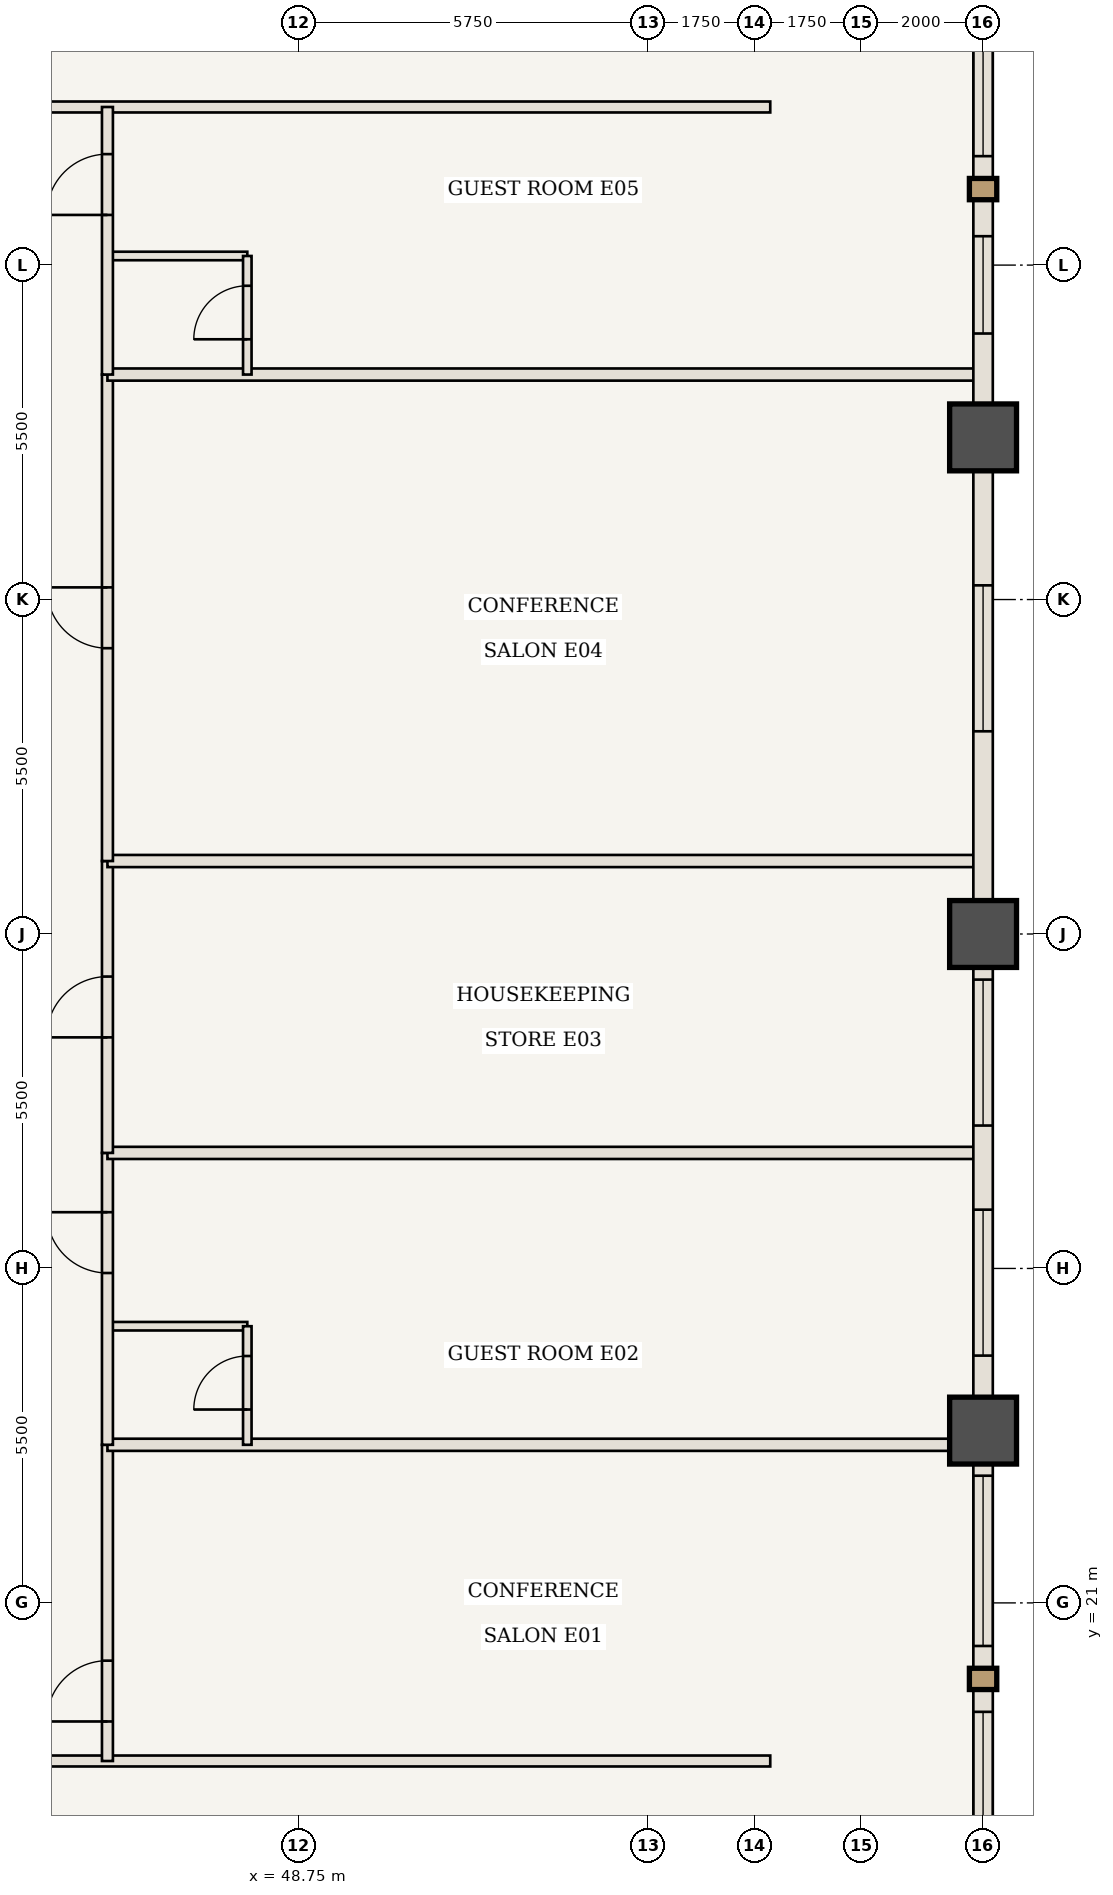
"""IFC4 building model, lengths in metres.
Left out: names, types, materials, properties, quantities, classifications, styles, units other than length and angle.
Written with IfcOpenShell. Run it as: python <this file> out.ifc"""

import sys

from ifc_helpers import new_model, si_unit, direction, frame, frame_2d, origin, origin_2d, place, context, subcontext, project, spatial, rectangle, extrude, element, fill, save


model = new_model("IFC4")
c1 = context("Model", 3, precision=1e-05, world=origin(), true_north=direction((0.0, 1.0)))
c2 = subcontext(c1, "Body", "Model", "MODEL_VIEW")
j1 = project(units=[si_unit("LENGTHUNIT", "METRE"), si_unit("PLANEANGLEUNIT", "RADIAN")], contexts=[c1])
p1 = place(None, origin())
s1 = spatial("IfcSite", under=j1, at=p1, CompositionType="ELEMENT")
p2 = place(p1, origin())
s2 = spatial("IfcBuilding", under=s1, at=p2, CompositionType="ELEMENT")
p3 = place(p2, frame((0.0, 0.0, 45.85)))
s3 = spatial("IfcBuildingStorey", under=s2, at=p3, CompositionType="ELEMENT", Elevation=45.85)
for number, where, z_axis, x_axis in (
    (1, (60.0, 23.833, 0.0), (0.0, 0.0, 1.0), (1.0, 0.0, 0.0)),
    (2, (60.0, 32.0, 0.0), (0.0, 0.0, 1.0), (1.0, 0.0, 0.0)),
    (3, (60.0, 40.167, 0.0), (0.0, 0.0, 1.0), (1.0, 0.0, 0.0)),
):
    element("IfcColumn", number, at=place(p3, frame(where, z_axis=z_axis, x_axis=x_axis)), inside=s3, PredefinedType="COLUMN", context=c2, shape_type="SweptSolid", body=[
        extrude(rectangle(XDim=1.1, YDim=1.1, at=origin_2d()), origin(), (0.0, 0.0, 1.0), 3.5),
    ])
p4 = place(p3, frame((37.9, 18.4, 0.0), z_axis=(0.0, 0.0, 1.0), x_axis=(1.0, 0.0, 0.0)))
e4 = element("IfcWall", 4, at=p4, inside=s3, PredefinedType="STANDARD", context=c2, shape_type="SweptSolid", body=[
    extrude(rectangle(XDim=18.6, YDim=0.18, at=frame_2d((9.3, 0.0))), origin(), (0.0, 0.0, 1.0), 3.32),
])
p5 = place(p4, frame((4.775, 0.0, 0.0)))
e5 = element("IfcOpeningElement", 5, at=p5, cuts=e4, PredefinedType="OPENING", context=c2, shape_type="SweptSolid", body=[
    extrude(rectangle(XDim=1.0, YDim=2.15, at=frame_2d((0.5, 1.075))), frame((0.0, 0.1, 0.0), z_axis=(0.0, -1.0, 0.0), x_axis=(1.0, 0.0, 0.0)), (0.0, 0.0, 1.0), 0.2),
])
p6 = place(p3, frame((38.2, 45.6, 0.0), z_axis=(0.0, 0.0, 1.0), x_axis=(1.0, 0.0, 0.0)))
e6 = element("IfcWall", 6, at=p6, inside=s3, PredefinedType="STANDARD", context=c2, shape_type="SweptSolid", body=[
    extrude(rectangle(XDim=18.3, YDim=0.18, at=frame_2d((9.15, 0.0))), origin(), (0.0, 0.0, 1.0), 3.32),
])
p7 = place(p6, frame((4.625, 0.0, 0.0)))
e7 = element("IfcOpeningElement", 7, at=p7, cuts=e6, PredefinedType="OPENING", context=c2, shape_type="SweptSolid", body=[
    extrude(rectangle(XDim=1.0, YDim=2.15, at=frame_2d((0.5, 1.075))), frame((0.0, 0.1, 0.0), z_axis=(0.0, -1.0, 0.0), x_axis=(1.0, 0.0, 0.0)), (0.0, 0.0, 1.0), 0.2),
])
p8 = place(p3, frame((45.6, 18.4, 0.0), z_axis=(0.0, 0.0, 1.0), x_axis=(0.0, 1.0, 0.0)))
e8 = element("IfcWall", 8, at=p8, inside=s3, PredefinedType="STANDARD", context=c2, shape_type="SweptSolid", body=[
    extrude(rectangle(XDim=5.2, YDim=0.18, at=frame_2d((2.6, 0.0))), origin(), (0.0, 0.0, 1.0), 3.32),
])
p9 = place(p8, frame((0.65, 0.0, 0.0)))
e9 = element("IfcOpeningElement", 9, at=p9, cuts=e8, PredefinedType="OPENING", context=c2, shape_type="SweptSolid", body=[
    extrude(rectangle(XDim=1.0, YDim=2.15, at=frame_2d((0.5, 1.075))), frame((0.0, 0.1, 0.0), z_axis=(0.0, -1.0, 0.0), x_axis=(1.0, 0.0, 0.0)), (0.0, 0.0, 1.0), 0.2),
])
p10 = place(p3, frame((45.6, 23.6, 0.0), z_axis=(0.0, 0.0, 1.0), x_axis=(1.0, 0.0, 0.0)))
e10 = element("IfcWall", 10, at=p10, inside=s3, PredefinedType="STANDARD", context=c2, shape_type="SweptSolid", body=[
    extrude(rectangle(XDim=14.34, YDim=0.2, at=frame_2d((7.17, 0.0))), origin(), (0.0, 0.0, 1.0), 3.32),
])
p11 = place(p3, frame((45.6, 25.55, 0.0), z_axis=(0.0, 0.0, 1.0), x_axis=(1.0, 0.0, 0.0)))
e11 = element("IfcWall", 11, at=p11, inside=s3, PredefinedType="STANDARD", context=c2, shape_type="SweptSolid", body=[
    extrude(rectangle(XDim=2.3, YDim=0.14, at=frame_2d((1.15, 0.0))), origin(), (0.0, 0.0, 1.0), 3.32),
])
p12 = place(p3, frame((47.9, 23.6, 0.0), z_axis=(0.0, 0.0, 1.0), x_axis=(0.0, 1.0, 0.0)))
e12 = element("IfcWall", 12, at=p12, inside=s3, PredefinedType="STANDARD", context=c2, shape_type="SweptSolid", body=[
    extrude(rectangle(XDim=1.95, YDim=0.14, at=frame_2d((0.975, 0.0))), origin(), (0.0, 0.0, 1.0), 3.32),
])
p13 = place(p12, frame((0.58, 0.0, 0.0)))
e13 = element("IfcOpeningElement", 13, at=p13, cuts=e12, PredefinedType="OPENING", context=c2, shape_type="SweptSolid", body=[
    extrude(rectangle(XDim=0.88, YDim=2.1, at=frame_2d((0.44, 1.05))), frame((0.0, 0.08, 0.0), z_axis=(0.0, -1.0, 0.0), x_axis=(1.0, 0.0, 0.0)), (0.0, 0.0, 1.0), 0.16),
])
p14 = place(p3, frame((45.6, 23.6, 0.0), z_axis=(0.0, 0.0, 1.0), x_axis=(0.0, 1.0, 0.0)))
e14 = element("IfcWall", 14, at=p14, inside=s3, PredefinedType="STANDARD", context=c2, shape_type="SweptSolid", body=[
    extrude(rectangle(XDim=4.8, YDim=0.18, at=frame_2d((2.4, 0.0))), origin(), (0.0, 0.0, 1.0), 3.32),
])
p15 = place(p14, frame((2.825, 0.0, 0.0)))
e15 = element("IfcOpeningElement", 15, at=p15, cuts=e14, PredefinedType="OPENING", context=c2, shape_type="SweptSolid", body=[
    extrude(rectangle(XDim=1.0, YDim=2.15, at=frame_2d((0.5, 1.075))), frame((0.0, 0.1, 0.0), z_axis=(0.0, -1.0, 0.0), x_axis=(1.0, 0.0, 0.0)), (0.0, 0.0, 1.0), 0.2),
])
p16 = place(p3, frame((45.6, 28.4, 0.0), z_axis=(0.0, 0.0, 1.0), x_axis=(1.0, 0.0, 0.0)))
e16 = element("IfcWall", 16, at=p16, inside=s3, PredefinedType="STANDARD", context=c2, shape_type="SweptSolid", body=[
    extrude(rectangle(XDim=14.34, YDim=0.2, at=frame_2d((7.17, 0.0))), origin(), (0.0, 0.0, 1.0), 3.32),
])
p17 = place(p3, frame((45.6, 28.4, 0.0), z_axis=(0.0, 0.0, 1.0), x_axis=(0.0, 1.0, 0.0)))
e17 = element("IfcWall", 17, at=p17, inside=s3, PredefinedType="STANDARD", context=c2, shape_type="SweptSolid", body=[
    extrude(rectangle(XDim=4.8, YDim=0.18, at=frame_2d((2.4, 0.0))), origin(), (0.0, 0.0, 1.0), 3.32),
])
p18 = place(p17, frame((1.9, 0.0, 0.0)))
e18 = element("IfcOpeningElement", 18, at=p18, cuts=e17, PredefinedType="OPENING", context=c2, shape_type="SweptSolid", body=[
    extrude(rectangle(XDim=1.0, YDim=2.15, at=frame_2d((0.5, 1.075))), frame((0.0, 0.1, 0.0), z_axis=(0.0, -1.0, 0.0), x_axis=(1.0, 0.0, 0.0)), (0.0, 0.0, 1.0), 0.2),
])
p19 = place(p3, frame((45.6, 33.2, 0.0), z_axis=(0.0, 0.0, 1.0), x_axis=(1.0, 0.0, 0.0)))
e19 = element("IfcWall", 19, at=p19, inside=s3, PredefinedType="STANDARD", context=c2, shape_type="SweptSolid", body=[
    extrude(rectangle(XDim=14.34, YDim=0.2, at=frame_2d((7.17, 0.0))), origin(), (0.0, 0.0, 1.0), 3.32),
])
p20 = place(p3, frame((45.6, 33.2, 0.0), z_axis=(0.0, 0.0, 1.0), x_axis=(0.0, 1.0, 0.0)))
e20 = element("IfcWall", 20, at=p20, inside=s3, PredefinedType="STANDARD", context=c2, shape_type="SweptSolid", body=[
    extrude(rectangle(XDim=8.0, YDim=0.18, at=frame_2d((4.0, 0.0))), origin(), (0.0, 0.0, 1.0), 3.32),
])
p21 = place(p20, frame((3.5, 0.0, 0.0)))
e21 = element("IfcOpeningElement", 21, at=p21, cuts=e20, PredefinedType="OPENING", context=c2, shape_type="SweptSolid", body=[
    extrude(rectangle(XDim=1.0, YDim=2.15, at=frame_2d((0.5, 1.075))), frame((0.0, 0.1, 0.0), z_axis=(0.0, -1.0, 0.0), x_axis=(1.0, 0.0, 0.0)), (0.0, 0.0, 1.0), 0.2),
])
p22 = place(p3, frame((45.6, 41.2, 0.0), z_axis=(0.0, 0.0, 1.0), x_axis=(1.0, 0.0, 0.0)))
e22 = element("IfcWall", 22, at=p22, inside=s3, PredefinedType="STANDARD", context=c2, shape_type="SweptSolid", body=[
    extrude(rectangle(XDim=14.34, YDim=0.2, at=frame_2d((7.17, 0.0))), origin(), (0.0, 0.0, 1.0), 3.32),
])
p23 = place(p3, frame((45.6, 43.15, 0.0), z_axis=(0.0, 0.0, 1.0), x_axis=(1.0, 0.0, 0.0)))
e23 = element("IfcWall", 23, at=p23, inside=s3, PredefinedType="STANDARD", context=c2, shape_type="SweptSolid", body=[
    extrude(rectangle(XDim=2.3, YDim=0.14, at=frame_2d((1.15, 0.0))), origin(), (0.0, 0.0, 1.0), 2.615),
])
p24 = place(p3, frame((47.9, 41.2, 0.0), z_axis=(0.0, 0.0, 1.0), x_axis=(0.0, 1.0, 0.0)))
e24 = element("IfcWall", 24, at=p24, inside=s3, PredefinedType="STANDARD", context=c2, shape_type="SweptSolid", body=[
    extrude(rectangle(XDim=1.95, YDim=0.14, at=frame_2d((0.975, 0.0))), origin(), (0.0, 0.0, 1.0), 3.32),
])
p25 = place(p24, frame((0.58, 0.0, 0.0)))
e25 = element("IfcOpeningElement", 25, at=p25, cuts=e24, PredefinedType="OPENING", context=c2, shape_type="SweptSolid", body=[
    extrude(rectangle(XDim=0.88, YDim=2.1, at=frame_2d((0.44, 1.05))), frame((0.0, 0.08, 0.0), z_axis=(0.0, -1.0, 0.0), x_axis=(1.0, 0.0, 0.0)), (0.0, 0.0, 1.0), 0.16),
])
p26 = place(p3, frame((45.6, 41.2, 0.0), z_axis=(0.0, 0.0, 1.0), x_axis=(0.0, 1.0, 0.0)))
e26 = element("IfcWall", 26, at=p26, inside=s3, PredefinedType="STANDARD", context=c2, shape_type="SweptSolid", body=[
    extrude(rectangle(XDim=4.4, YDim=0.18, at=frame_2d((2.2, 0.0))), origin(), (0.0, 0.0, 1.0), 3.32),
])
p27 = place(p26, frame((2.625, 0.0, 0.0)))
e27 = element("IfcOpeningElement", 27, at=p27, cuts=e26, PredefinedType="OPENING", context=c2, shape_type="SweptSolid", body=[
    extrude(rectangle(XDim=1.0, YDim=2.15, at=frame_2d((0.5, 1.075))), frame((0.0, 0.1, 0.0), z_axis=(0.0, -1.0, 0.0), x_axis=(1.0, 0.0, 0.0)), (0.0, 0.0, 1.0), 0.2),
])
p28 = place(p3, frame((60.0, 23.833, 0.0), z_axis=(0.0, 0.0, 1.0), x_axis=(0.0, -1.0, 0.0)))
e28 = element("IfcWall", 28, at=p28, inside=s3, PredefinedType="USERDEFINED", context=c2, shape_type="SweptSolid", body=[
    extrude(rectangle(XDim=8.167, YDim=0.32, at=frame_2d((4.083, 0.0))), origin(), (0.0, 0.0, 1.0), 2.52),
])
p29 = place(p28, frame((0.742, 0.0, 0.85)))
e29 = element("IfcOpeningElement", 29, at=p29, cuts=e28, PredefinedType="OPENING", context=c2, shape_type="SweptSolid", body=[
    extrude(rectangle(XDim=2.8, YDim=1.47, at=frame_2d((1.4, 0.735))), frame((0.0, 0.17, 0.0), z_axis=(0.0, -1.0, 0.0), x_axis=(1.0, 0.0, 0.0)), (0.0, 0.0, 1.0), 0.34),
])
p30 = place(p28, frame((4.625, 0.0, 0.85)))
e30 = element("IfcOpeningElement", 30, at=p30, cuts=e28, PredefinedType="OPENING", context=c2, shape_type="SweptSolid", body=[
    extrude(rectangle(XDim=2.8, YDim=1.47, at=frame_2d((1.4, 0.735))), frame((0.0, 0.17, 0.0), z_axis=(0.0, -1.0, 0.0), x_axis=(1.0, 0.0, 0.0)), (0.0, 0.0, 1.0), 0.34),
])
p31 = place(p3, frame((60.0, 32.0, 0.0), z_axis=(0.0, 0.0, 1.0), x_axis=(0.0, -1.0, 0.0)))
e31 = element("IfcWall", 31, at=p31, inside=s3, PredefinedType="USERDEFINED", context=c2, shape_type="SweptSolid", body=[
    extrude(rectangle(XDim=8.167, YDim=0.32, at=frame_2d((4.083, 0.0))), origin(), (0.0, 0.0, 1.0), 2.52),
])
p32 = place(p31, frame((0.75, 0.0, 0.85)))
e32 = element("IfcOpeningElement", 32, at=p32, cuts=e31, PredefinedType="OPENING", context=c2, shape_type="SweptSolid", body=[
    extrude(rectangle(XDim=2.4, YDim=1.47, at=frame_2d((1.2, 0.735))), frame((0.0, 0.17, 0.0), z_axis=(0.0, -1.0, 0.0), x_axis=(1.0, 0.0, 0.0)), (0.0, 0.0, 1.0), 0.34),
])
p33 = place(p31, frame((4.533, 0.0, 0.85)))
e33 = element("IfcOpeningElement", 33, at=p33, cuts=e31, PredefinedType="OPENING", context=c2, shape_type="SweptSolid", body=[
    extrude(rectangle(XDim=2.4, YDim=1.47, at=frame_2d((1.2, 0.735))), frame((0.0, 0.17, 0.0), z_axis=(0.0, -1.0, 0.0), x_axis=(1.0, 0.0, 0.0)), (0.0, 0.0, 1.0), 0.34),
])
p34 = place(p3, frame((60.0, 40.167, 0.0), z_axis=(0.0, 0.0, 1.0), x_axis=(0.0, -1.0, 0.0)))
e34 = element("IfcWall", 34, at=p34, inside=s3, PredefinedType="USERDEFINED", context=c2, shape_type="SweptSolid", body=[
    extrude(rectangle(XDim=8.167, YDim=0.32, at=frame_2d((4.083, 0.0))), origin(), (0.0, 0.0, 1.0), 2.52),
])
p35 = place(p34, frame((2.433, 0.0, 0.85)))
e35 = element("IfcOpeningElement", 35, at=p35, cuts=e34, PredefinedType="OPENING", context=c2, shape_type="SweptSolid", body=[
    extrude(rectangle(XDim=2.4, YDim=1.47, at=frame_2d((1.2, 0.735))), frame((0.0, 0.17, 0.0), z_axis=(0.0, -1.0, 0.0), x_axis=(1.0, 0.0, 0.0)), (0.0, 0.0, 1.0), 0.34),
])
p36 = place(p3, frame((60.0, 48.333, 0.0), z_axis=(0.0, 0.0, 1.0), x_axis=(0.0, -1.0, 0.0)))
e36 = element("IfcWall", 36, at=p36, inside=s3, PredefinedType="USERDEFINED", context=c2, shape_type="SweptSolid", body=[
    extrude(rectangle(XDim=8.167, YDim=0.32, at=frame_2d((4.083, 0.0))), origin(), (0.0, 0.0, 1.0), 2.52),
])
p37 = place(p36, frame((0.742, 0.0, 0.85)))
e37 = element("IfcOpeningElement", 37, at=p37, cuts=e36, PredefinedType="OPENING", context=c2, shape_type="SweptSolid", body=[
    extrude(rectangle(XDim=2.8, YDim=1.47, at=frame_2d((1.4, 0.735))), frame((0.0, 0.17, 0.0), z_axis=(0.0, -1.0, 0.0), x_axis=(1.0, 0.0, 0.0)), (0.0, 0.0, 1.0), 0.34),
])
p38 = place(p36, frame((4.858, 0.0, 0.85)))
e38 = element("IfcOpeningElement", 38, at=p38, cuts=e36, PredefinedType="OPENING", context=c2, shape_type="SweptSolid", body=[
    extrude(rectangle(XDim=1.6, YDim=1.47, at=frame_2d((0.8, 0.735))), frame((0.0, 0.17, 0.0), z_axis=(0.0, -1.0, 0.0), x_axis=(1.0, 0.0, 0.0)), (0.0, 0.0, 1.0), 0.34),
])
p39 = place(p9, origin())
e39 = element("IfcDoor", 39, at=p39, inside=s3, OperationType="SINGLE_SWING_LEFT", PredefinedType="DOOR", context=c2, shape_type="SweptSolid", body=[
    extrude(rectangle(XDim=1.0, YDim=2.15, at=frame_2d((0.5, 1.075))), frame((0.0, 0.025, 0.0), z_axis=(0.0, -1.0, 0.0), x_axis=(1.0, 0.0, 0.0)), (0.0, 0.0, 1.0), 0.05),
])
fill(e9, e39)
p40 = place(p13, origin())
e40 = element("IfcDoor", 40, at=p40, inside=s3, OperationType="SINGLE_SWING_LEFT", PredefinedType="DOOR", context=c2, shape_type="SweptSolid", body=[
    extrude(rectangle(XDim=0.88, YDim=2.1, at=frame_2d((0.44, 1.05))), frame((0.0, 0.025, 0.0), z_axis=(0.0, -1.0, 0.0), x_axis=(1.0, 0.0, 0.0)), (0.0, 0.0, 1.0), 0.05),
])
fill(e13, e40)
p41 = place(p15, origin())
e41 = element("IfcDoor", 41, at=p41, inside=s3, OperationType="SINGLE_SWING_RIGHT", PredefinedType="DOOR", context=c2, shape_type="SweptSolid", body=[
    extrude(rectangle(XDim=1.0, YDim=2.15, at=frame_2d((0.5, 1.075))), frame((0.0, 0.025, 0.0), z_axis=(0.0, -1.0, 0.0), x_axis=(1.0, 0.0, 0.0)), (0.0, 0.0, 1.0), 0.05),
])
fill(e15, e41)
p42 = place(p18, origin())
e42 = element("IfcDoor", 42, at=p42, inside=s3, OperationType="SINGLE_SWING_LEFT", PredefinedType="DOOR", context=c2, shape_type="SweptSolid", body=[
    extrude(rectangle(XDim=1.0, YDim=2.15, at=frame_2d((0.5, 1.075))), frame((0.0, 0.025, 0.0), z_axis=(0.0, -1.0, 0.0), x_axis=(1.0, 0.0, 0.0)), (0.0, 0.0, 1.0), 0.05),
])
fill(e18, e42)
p43 = place(p21, origin())
e43 = element("IfcDoor", 43, at=p43, inside=s3, OperationType="SINGLE_SWING_RIGHT", PredefinedType="DOOR", context=c2, shape_type="SweptSolid", body=[
    extrude(rectangle(XDim=1.0, YDim=2.15, at=frame_2d((0.5, 1.075))), frame((0.0, 0.025, 0.0), z_axis=(0.0, -1.0, 0.0), x_axis=(1.0, 0.0, 0.0)), (0.0, 0.0, 1.0), 0.05),
])
fill(e21, e43)
p44 = place(p25, origin())
e44 = element("IfcDoor", 44, at=p44, inside=s3, OperationType="SINGLE_SWING_LEFT", PredefinedType="DOOR", context=c2, shape_type="SweptSolid", body=[
    extrude(rectangle(XDim=0.88, YDim=2.1, at=frame_2d((0.44, 1.05))), frame((0.0, 0.025, 0.0), z_axis=(0.0, -1.0, 0.0), x_axis=(1.0, 0.0, 0.0)), (0.0, 0.0, 1.0), 0.05),
])
fill(e25, e44)
p45 = place(p27, origin())
e45 = element("IfcDoor", 45, at=p45, inside=s3, OperationType="SINGLE_SWING_LEFT", PredefinedType="DOOR", context=c2, shape_type="SweptSolid", body=[
    extrude(rectangle(XDim=1.0, YDim=2.15, at=frame_2d((0.5, 1.075))), frame((0.0, 0.025, 0.0), z_axis=(0.0, -1.0, 0.0), x_axis=(1.0, 0.0, 0.0)), (0.0, 0.0, 1.0), 0.05),
])
fill(e27, e45)
p46 = place(p29, origin())
e46 = element("IfcWindow", 46, at=p46, inside=s3, PartitioningType="SINGLE_PANEL", PredefinedType="WINDOW", context=c2, shape_type="SweptSolid", body=[
    extrude(rectangle(XDim=2.8, YDim=1.47, at=frame_2d((1.4, 0.735))), frame((0.0, 0.03, 0.0), z_axis=(0.0, -1.0, 0.0), x_axis=(1.0, 0.0, 0.0)), (0.0, 0.0, 1.0), 0.06),
])
fill(e29, e46)
p47 = place(p30, origin())
e47 = element("IfcWindow", 47, at=p47, inside=s3, PartitioningType="SINGLE_PANEL", PredefinedType="WINDOW", context=c2, shape_type="SweptSolid", body=[
    extrude(rectangle(XDim=2.8, YDim=1.47, at=frame_2d((1.4, 0.735))), frame((0.0, 0.03, 0.0), z_axis=(0.0, -1.0, 0.0), x_axis=(1.0, 0.0, 0.0)), (0.0, 0.0, 1.0), 0.06),
])
fill(e30, e47)
p48 = place(p32, origin())
e48 = element("IfcWindow", 48, at=p48, inside=s3, PartitioningType="SINGLE_PANEL", PredefinedType="WINDOW", context=c2, shape_type="SweptSolid", body=[
    extrude(rectangle(XDim=2.4, YDim=1.47, at=frame_2d((1.2, 0.735))), frame((0.0, 0.03, 0.0), z_axis=(0.0, -1.0, 0.0), x_axis=(1.0, 0.0, 0.0)), (0.0, 0.0, 1.0), 0.06),
])
fill(e32, e48)
p49 = place(p33, origin())
e49 = element("IfcWindow", 49, at=p49, inside=s3, PartitioningType="SINGLE_PANEL", PredefinedType="WINDOW", context=c2, shape_type="SweptSolid", body=[
    extrude(rectangle(XDim=2.4, YDim=1.47, at=frame_2d((1.2, 0.735))), frame((0.0, 0.03, 0.0), z_axis=(0.0, -1.0, 0.0), x_axis=(1.0, 0.0, 0.0)), (0.0, 0.0, 1.0), 0.06),
])
fill(e33, e49)
p50 = place(p35, origin())
e50 = element("IfcWindow", 50, at=p50, inside=s3, PartitioningType="SINGLE_PANEL", PredefinedType="WINDOW", context=c2, shape_type="SweptSolid", body=[
    extrude(rectangle(XDim=2.4, YDim=1.47, at=frame_2d((1.2, 0.735))), frame((0.0, 0.03, 0.0), z_axis=(0.0, -1.0, 0.0), x_axis=(1.0, 0.0, 0.0)), (0.0, 0.0, 1.0), 0.06),
])
fill(e35, e50)
p51 = place(p37, origin())
e51 = element("IfcWindow", 51, at=p51, inside=s3, PartitioningType="SINGLE_PANEL", PredefinedType="WINDOW", context=c2, shape_type="SweptSolid", body=[
    extrude(rectangle(XDim=2.8, YDim=1.47, at=frame_2d((1.4, 0.735))), frame((0.0, 0.03, 0.0), z_axis=(0.0, -1.0, 0.0), x_axis=(1.0, 0.0, 0.0)), (0.0, 0.0, 1.0), 0.06),
])
fill(e37, e51)
p52 = place(p38, origin())
e52 = element("IfcWindow", 52, at=p52, inside=s3, PartitioningType="SINGLE_PANEL", PredefinedType="WINDOW", context=c2, shape_type="SweptSolid", body=[
    extrude(rectangle(XDim=1.6, YDim=1.47, at=frame_2d((0.8, 0.735))), frame((0.0, 0.03, 0.0), z_axis=(0.0, -1.0, 0.0), x_axis=(1.0, 0.0, 0.0)), (0.0, 0.0, 1.0), 0.06),
])
fill(e38, e52)
save(model, sys.argv[1])
